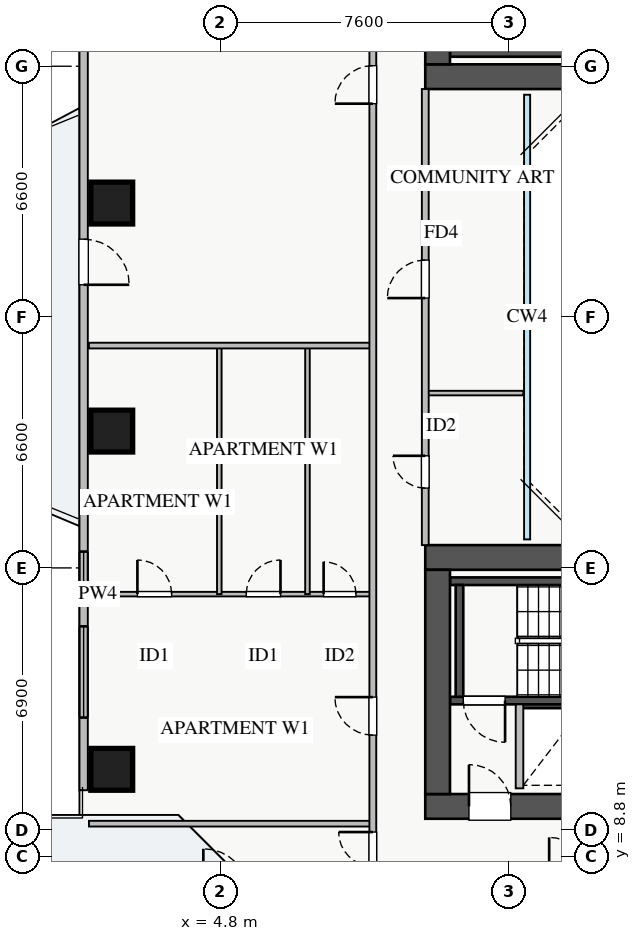
"""IFC4 building model, lengths in metres.
Left out: names, types, materials, properties, quantities, classifications, styles, units other than length and angle.
Written with IfcOpenShell. Run it as: python <this file> out.ifc"""

import sys

from ifc_helpers import new_model, si_unit, direction, frame, frame_2d, origin, origin_2d, place, context, subcontext, project, spatial, rectangle, extrude, source, transform, mapped, element, fill, save


model = new_model("IFC4")
c1 = context("Model", 3, precision=1e-05, world=origin(), true_north=direction((0.0, 1.0)))
c2 = subcontext(c1, "Body", "Model", "MODEL_VIEW")
j1 = project(units=[si_unit("LENGTHUNIT", "METRE"), si_unit("PLANEANGLEUNIT", "RADIAN")], contexts=[c1])
p1 = place(None, origin())
s1 = spatial("IfcSite", under=j1, at=p1, CompositionType="ELEMENT")
p2 = place(p1, origin())
s2 = spatial("IfcBuilding", under=s1, at=p2, CompositionType="ELEMENT")
p3 = place(p2, frame((0.0, 0.0, 103.5)))
s3 = spatial("IfcBuildingStorey", under=s2, at=p3, CompositionType="ELEMENT", Elevation=103.5)
p4 = place(p3, frame((12.68, 12.8, 0.0), z_axis=(0.0, 0.0, 1.0), x_axis=(1.0, 0.0, 0.0)))
e1 = element("IfcWall", 1, at=p4, inside=s3, PredefinedType="SHEAR", context=c2, shape_type="SweptSolid", body=[
    extrude(rectangle(XDim=1.94, YDim=0.18, at=frame_2d((0.97, 0.0))), origin(), (0.0, 0.0, 1.0), 3.07),
])
p5 = place(p3, frame((10.85, 29.95, 0.0), z_axis=(0.0, 0.0, 1.0), x_axis=(1.0, 0.0, 0.0)))
e2 = element("IfcWall", 2, at=p5, inside=s3, PredefinedType="SHEAR", context=c2, shape_type="SweptSolid", body=[
    extrude(rectangle(XDim=7.3, YDim=0.2, at=frame_2d((3.65, 0.0))), origin(), (0.0, 0.0, 1.0), 3.25),
])
p6 = place(p3, frame((10.85, 12.91, 0.0), z_axis=(0.0, 0.0, 1.0), x_axis=(1.0, 0.0, 0.0)))
e3 = element("IfcWall", 3, at=p6, inside=s3, PredefinedType="SHEAR", context=c2, shape_type="SweptSolid", body=[
    extrude(rectangle(XDim=7.3, YDim=0.2, at=frame_2d((3.65, 0.0))), origin(), (0.0, 0.0, 1.0), 3.25),
])
p7 = place(p6, frame((0.35, 0.0, 0.0)))
e4 = element("IfcOpeningElement", 4, at=p7, cuts=e3, PredefinedType="OPENING", context=c2, shape_type="SweptSolid", body=[
    extrude(rectangle(XDim=1.1, YDim=2.05, at=frame_2d((0.55, 1.025))), frame((0.0, 0.11, 0.0), z_axis=(0.0, -1.0, 0.0), x_axis=(1.0, 0.0, 0.0)), (0.0, 0.0, 1.0), 0.22),
])
p8 = place(p3, frame((10.85, 16.05, 0.0), z_axis=(0.0, 0.0, 1.0), x_axis=(1.0, 0.0, 0.0)))
e5 = element("IfcWall", 5, at=p8, inside=s3, PredefinedType="SHEAR", context=c2, shape_type="SweptSolid", body=[
    extrude(rectangle(XDim=7.3, YDim=0.2, at=frame_2d((3.65, 0.0))), origin(), (0.0, 0.0, 1.0), 3.25),
])
p9 = place(p3, frame((11.1, 13.01, 0.0), z_axis=(0.0, 0.0, 1.0), x_axis=(0.0, 1.0, 0.0)))
e6 = element("IfcWall", 6, at=p9, inside=s3, PredefinedType="SHEAR", context=c2, shape_type="SweptSolid", body=[
    extrude(rectangle(XDim=2.94, YDim=0.2, at=frame_2d((1.47, 0.0))), origin(), (0.0, 0.0, 1.0), 3.25),
])
p10 = place(p3, frame((10.2, 29.325, 0.0), z_axis=(0.0, 0.0, 1.0), x_axis=(1.0, 0.0, 0.0)))
e7 = element("IfcWall", 7, at=p10, inside=s3, PredefinedType="SHEAR", context=c2, shape_type="SweptSolid", body=[
    extrude(rectangle(XDim=17.6, YDim=0.65, at=frame_2d((8.8, 0.0))), origin(), (0.0, 0.0, 1.0), 3.25),
])
p11 = place(p3, frame((10.525, 29.65, 0.0), z_axis=(0.0, 0.0, 1.0), x_axis=(0.0, 1.0, 0.0)))
e8 = element("IfcWall", 8, at=p11, inside=s3, PredefinedType="SHEAR", context=c2, shape_type="SweptSolid", body=[
    extrude(rectangle(XDim=5.9, YDim=0.65, at=frame_2d((2.95, 0.0))), origin(), (0.0, 0.0, 1.0), 3.25),
])
p12 = place(p3, frame((10.2, 10.125, 0.0), z_axis=(0.0, 0.0, 1.0), x_axis=(1.0, 0.0, 0.0)))
e9 = element("IfcWall", 9, at=p12, inside=s3, PredefinedType="SHEAR", context=c2, shape_type="SweptSolid", body=[
    extrude(rectangle(XDim=17.6, YDim=0.65, at=frame_2d((8.8, 0.0))), origin(), (0.0, 0.0, 1.0), 3.25),
])
p13 = place(p12, frame((1.15, 0.0, 0.0)))
e10 = element("IfcOpeningElement", 10, at=p13, cuts=e9, PredefinedType="OPENING", context=c2, shape_type="SweptSolid", body=[
    extrude(rectangle(XDim=1.1, YDim=2.05, at=frame_2d((0.55, 1.025))), frame((0.0, 0.335, 0.0), z_axis=(0.0, -1.0, 0.0), x_axis=(1.0, 0.0, 0.0)), (0.0, 0.0, 1.0), 0.67),
])
p14 = place(p12, frame((8.3, 0.0, 0.0)))
e11 = element("IfcOpeningElement", 11, at=p14, cuts=e9, PredefinedType="OPENING", context=c2, shape_type="SweptSolid", body=[
    extrude(rectangle(XDim=1.1, YDim=2.05, at=frame_2d((0.55, 1.025))), frame((0.0, 0.335, 0.0), z_axis=(0.0, -1.0, 0.0), x_axis=(1.0, 0.0, 0.0)), (0.0, 0.0, 1.0), 0.67),
])
p15 = place(p12, frame((4.9, 0.0, 0.0)))
e12 = element("IfcOpeningElement", 12, at=p15, cuts=e9, PredefinedType="OPENING", context=c2, shape_type="SweptSolid", body=[
    extrude(rectangle(XDim=1.1, YDim=2.05, at=frame_2d((0.55, 1.025))), frame((0.0, 0.335, 0.0), z_axis=(0.0, -1.0, 0.0), x_axis=(1.0, 0.0, 0.0)), (0.0, 0.0, 1.0), 0.67),
])
p16 = place(p12, frame((14.74, 0.0, 0.0)))
e13 = element("IfcOpeningElement", 13, at=p16, cuts=e9, PredefinedType="OPENING", context=c2, shape_type="SweptSolid", body=[
    extrude(rectangle(XDim=1.0, YDim=2.05, at=frame_2d((0.5, 1.025))), frame((0.0, 0.335, 0.0), z_axis=(0.0, -1.0, 0.0), x_axis=(1.0, 0.0, 0.0)), (0.0, 0.0, 1.0), 0.67),
])
p17 = place(p12, frame((10.155, 0.0, 0.0)))
e14 = element("IfcOpeningElement", 14, at=p17, cuts=e9, PredefinedType="OPENING", context=c2, shape_type="SweptSolid", body=[
    extrude(rectangle(XDim=1.0, YDim=2.05, at=frame_2d((0.5, 1.025))), frame((0.0, 0.335, 0.0), z_axis=(0.0, -1.0, 0.0), x_axis=(1.0, 0.0, 0.0)), (0.0, 0.0, 1.0), 0.67),
])
p18 = place(p12, frame((11.87, 0.0, 0.0)))
e15 = element("IfcOpeningElement", 15, at=p18, cuts=e9, PredefinedType="OPENING", context=c2, shape_type="SweptSolid", body=[
    extrude(rectangle(XDim=1.0, YDim=2.05, at=frame_2d((0.5, 1.025))), frame((0.0, 0.335, 0.0), z_axis=(0.0, -1.0, 0.0), x_axis=(1.0, 0.0, 0.0)), (0.0, 0.0, 1.0), 0.67),
])
p19 = place(p12, frame((13.46, 0.0, 0.0)))
e16 = element("IfcOpeningElement", 16, at=p19, cuts=e9, PredefinedType="OPENING", context=c2, shape_type="SweptSolid", body=[
    extrude(rectangle(XDim=1.0, YDim=2.05, at=frame_2d((0.5, 1.025))), frame((0.0, 0.335, 0.0), z_axis=(0.0, -1.0, 0.0), x_axis=(1.0, 0.0, 0.0)), (0.0, 0.0, 1.0), 0.67),
])
p20 = place(p3, frame((10.2, 16.675, 0.0), z_axis=(0.0, 0.0, 1.0), x_axis=(1.0, 0.0, 0.0)))
e17 = element("IfcWall", 17, at=p20, inside=s3, PredefinedType="SHEAR", context=c2, shape_type="SweptSolid", body=[
    extrude(rectangle(XDim=17.6, YDim=0.65, at=frame_2d((8.8, 0.0))), origin(), (0.0, 0.0, 1.0), 3.25),
])
p21 = place(p3, frame((10.525, 10.45, 0.0), z_axis=(0.0, 0.0, 1.0), x_axis=(0.0, 1.0, 0.0)))
e18 = element("IfcWall", 18, at=p21, inside=s3, PredefinedType="SHEAR", context=c2, shape_type="SweptSolid", body=[
    extrude(rectangle(XDim=5.9, YDim=0.65, at=frame_2d((2.95, 0.0))), origin(), (0.0, 0.0, 1.0), 3.25),
])
m1 = source(origin(), c2, "Body", "SweptSolid", [
    extrude(rectangle(XDim=1.1, YDim=1.1, at=origin_2d()), origin(), (0.0, 0.0, 1.0), 3.25),
])
for number, where, z_axis, x_axis in (
    (19, (1.95, 26.0, 0.0), (0.0, 0.0, 1.0), (1.0, 0.0, 0.0)),
    (20, (1.95, 20.0, 0.0), (0.0, 0.0, 1.0), (1.0, 0.0, 0.0)),
    (21, (1.95, 11.1, 0.0), (0.0, 0.0, 1.0), (1.0, 0.0, 0.0)),
):
    element("IfcColumn", number, at=place(p3, frame(where, z_axis=z_axis, x_axis=x_axis)), inside=s3, PredefinedType="COLUMN", context=c2, shape_type="MappedRepresentation", body=[
        mapped(m1, transform((0.0, 0.0, 0.0), x_axis=(1.0, 0.0, 0.0), y_axis=(0.0, 1.0, 0.0), z_axis=(0.0, 0.0, 1.0), scale=1.0)),
    ])
p22 = place(p3, frame((1.21, 10.55, 0.0), z_axis=(0.0, 0.0, 1.0), x_axis=(0.0, 1.0, 0.0)))
e22 = element("IfcWall", 22, at=p22, inside=s3, PredefinedType="STANDARD", context=c2, shape_type="SweptSolid", body=[
    extrude(rectangle(XDim=24.9, YDim=0.22, at=frame_2d((12.45, 0.0))), origin(), (0.0, 0.0, 1.0), 2.61),
])
p23 = place(p22, frame((13.3, 0.0, 0.0)))
e23 = element("IfcOpeningElement", 23, at=p23, cuts=e22, PredefinedType="OPENING", context=c2, shape_type="SweptSolid", body=[
    extrude(rectangle(XDim=1.2, YDim=2.1, at=frame_2d((0.6, 1.05))), frame((0.0, 0.12, 0.0), z_axis=(0.0, -1.0, 0.0), x_axis=(1.0, 0.0, 0.0)), (0.0, 0.0, 1.0), 0.24),
])
p24 = place(p22, frame((1.912, 0.0, 0.9)))
e24 = element("IfcOpeningElement", 24, at=p24, cuts=e22, PredefinedType="OPENING", context=c2, shape_type="SweptSolid", body=[
    extrude(rectangle(XDim=2.4, YDim=1.48, at=frame_2d((1.2, 0.74))), frame((0.0, 0.12, 0.0), z_axis=(0.0, -1.0, 0.0), x_axis=(1.0, 0.0, 0.0)), (0.0, 0.0, 1.0), 0.24),
])
p25 = place(p22, frame((20.737, 0.0, 0.9)))
e25 = element("IfcOpeningElement", 25, at=p25, cuts=e22, PredefinedType="OPENING", context=c2, shape_type="SweptSolid", body=[
    extrude(rectangle(XDim=2.1, YDim=1.48, at=frame_2d((1.05, 0.74))), frame((0.0, 0.12, 0.0), z_axis=(0.0, -1.0, 0.0), x_axis=(1.0, 0.0, 0.0)), (0.0, 0.0, 1.0), 0.24),
])
p26 = place(p22, frame((5.38, 0.0, 0.9)))
e26 = element("IfcOpeningElement", 26, at=p26, cuts=e22, PredefinedType="OPENING", context=c2, shape_type="SweptSolid", body=[
    extrude(rectangle(XDim=0.9, YDim=1.2, at=frame_2d((0.45, 0.6))), frame((0.0, 0.12, 0.0), z_axis=(0.0, -1.0, 0.0), x_axis=(1.0, 0.0, 0.0)), (0.0, 0.0, 1.0), 0.24),
])
p27 = place(p3, frame((12.68, 10.6, 0.0), z_axis=(0.0, 0.0, 1.0), x_axis=(0.0, 1.0, 0.0)))
e27 = element("IfcWall", 27, at=p27, inside=s3, PredefinedType="PARTITIONING", context=c2, shape_type="SweptSolid", body=[
    extrude(rectangle(XDim=2.21, YDim=0.2, at=frame_2d((1.105, 0.0))), origin(), (0.0, 0.0, 1.0), 3.07),
])
p28 = place(p3, frame((1.35, 9.67, 0.0), z_axis=(0.0, 0.0, 1.0), x_axis=(1.0, 0.0, 0.0)))
e28 = element("IfcWall", 28, at=p28, inside=s3, PredefinedType="PARTITIONING", context=c2, shape_type="SweptSolid", body=[
    extrude(rectangle(XDim=7.47, YDim=0.15, at=frame_2d((3.735, 0.0))), origin(), (0.0, 0.0, 1.0), 3.07),
])
p29 = place(p3, frame((1.35, 15.71, 0.0), z_axis=(0.0, 0.0, 1.0), x_axis=(1.0, 0.0, 0.0)))
e29 = element("IfcWall", 29, at=p29, inside=s3, PredefinedType="PLUMBINGWALL", context=c2, shape_type="SweptSolid", body=[
    extrude(rectangle(XDim=7.47, YDim=0.12, at=frame_2d((3.735, 0.0))), origin(), (0.0, 0.0, 1.0), 3.07),
])
p30 = place(p29, frame((1.275, 0.0, 0.0)))
e30 = element("IfcOpeningElement", 30, at=p30, cuts=e29, PredefinedType="OPENING", context=c2, shape_type="SweptSolid", body=[
    extrude(rectangle(XDim=0.9, YDim=2.05, at=frame_2d((0.45, 1.025))), frame((0.0, 0.07, 0.0), z_axis=(0.0, -1.0, 0.0), x_axis=(1.0, 0.0, 0.0)), (0.0, 0.0, 1.0), 0.14),
])
p31 = place(p29, frame((4.14, 0.0, 0.0)))
e31 = element("IfcOpeningElement", 31, at=p31, cuts=e29, PredefinedType="OPENING", context=c2, shape_type="SweptSolid", body=[
    extrude(rectangle(XDim=0.9, YDim=2.05, at=frame_2d((0.45, 1.025))), frame((0.0, 0.07, 0.0), z_axis=(0.0, -1.0, 0.0), x_axis=(1.0, 0.0, 0.0)), (0.0, 0.0, 1.0), 0.14),
])
p32 = place(p29, frame((6.175, 0.0, 0.0)))
e32 = element("IfcOpeningElement", 32, at=p32, cuts=e29, PredefinedType="OPENING", context=c2, shape_type="SweptSolid", body=[
    extrude(rectangle(XDim=0.85, YDim=2.05, at=frame_2d((0.425, 1.025))), frame((0.0, 0.07, 0.0), z_axis=(0.0, -1.0, 0.0), x_axis=(1.0, 0.0, 0.0)), (0.0, 0.0, 1.0), 0.14),
])
for number, where, z_axis, x_axis in (
    (33, (4.78, 15.71, 0.0), (0.0, 0.0, 1.0), (0.0, 1.0, 0.0)),
    (34, (7.1, 15.71, 0.0), (0.0, 0.0, 1.0), (0.0, 1.0, 0.0)),
):
    element("IfcWall", number, at=place(p3, frame(where, z_axis=z_axis, x_axis=x_axis)), inside=s3, PredefinedType="PLUMBINGWALL", context=c2, shape_type="SweptSolid", body=[
        extrude(rectangle(XDim=6.54, YDim=0.12, at=frame_2d((3.27, 0.0))), origin(), (0.0, 0.0, 1.0), 3.07),
    ])
p33 = place(p3, frame((1.35, 22.25, 0.0), z_axis=(0.0, 0.0, 1.0), x_axis=(1.0, 0.0, 0.0)))
e35 = element("IfcWall", 35, at=p33, inside=s3, PredefinedType="PARTITIONING", context=c2, shape_type="SweptSolid", body=[
    extrude(rectangle(XDim=7.47, YDim=0.15, at=frame_2d((3.735, 0.0))), origin(), (0.0, 0.0, 1.0), 3.07),
])
p34 = place(p3, frame((8.82, 8.31, 0.0), z_axis=(0.0, 0.0, 1.0), x_axis=(0.0, 1.0, 0.0)))
e36 = element("IfcWall", 36, at=p34, inside=s3, PredefinedType="PARTITIONING", context=c2, shape_type="SweptSolid", body=[
    extrude(rectangle(XDim=29.13, YDim=0.18, at=frame_2d((14.565, 0.0))), origin(), (0.0, 0.0, 1.0), 3.07),
])
p35 = place(p34, frame((27.94, 0.0, 0.0)))
e37 = element("IfcOpeningElement", 37, at=p35, cuts=e36, PredefinedType="OPENING", context=c2, shape_type="SweptSolid", body=[
    extrude(rectangle(XDim=0.9, YDim=2.05, at=frame_2d((0.45, 1.025))), frame((0.0, 0.1, 0.0), z_axis=(0.0, -1.0, 0.0), x_axis=(1.0, 0.0, 0.0)), (0.0, 0.0, 1.0), 0.2),
])
p36 = place(p34, frame((0.24, 0.0, 0.0)))
e38 = element("IfcOpeningElement", 38, at=p36, cuts=e36, PredefinedType="OPENING", context=c2, shape_type="SweptSolid", body=[
    extrude(rectangle(XDim=0.9, YDim=2.05, at=frame_2d((0.45, 1.025))), frame((0.0, 0.1, 0.0), z_axis=(0.0, -1.0, 0.0), x_axis=(1.0, 0.0, 0.0)), (0.0, 0.0, 1.0), 0.2),
])
p37 = place(p34, frame((3.69, 0.0, 0.0)))
e39 = element("IfcOpeningElement", 39, at=p37, cuts=e36, PredefinedType="OPENING", context=c2, shape_type="SweptSolid", body=[
    extrude(rectangle(XDim=1.0, YDim=2.05, at=frame_2d((0.5, 1.025))), frame((0.0, 0.1, 0.0), z_axis=(0.0, -1.0, 0.0), x_axis=(1.0, 0.0, 0.0)), (0.0, 0.0, 1.0), 0.2),
])
p38 = place(p34, frame((20.305, 0.0, 0.0)))
e40 = element("IfcOpeningElement", 40, at=p38, cuts=e36, PredefinedType="OPENING", context=c2, shape_type="SweptSolid", body=[
    extrude(rectangle(XDim=1.0, YDim=2.05, at=frame_2d((0.5, 1.025))), frame((0.0, 0.1, 0.0), z_axis=(0.0, -1.0, 0.0), x_axis=(1.0, 0.0, 0.0)), (0.0, 0.0, 1.0), 0.2),
])
p39 = place(p3, frame((10.2, 21.0, 0.0), z_axis=(0.0, 0.0, 1.0), x_axis=(1.0, 0.0, 0.0)))
e41 = element("IfcWall", 41, at=p39, inside=s3, PredefinedType="PLUMBINGWALL", context=c2, shape_type="SweptSolid", body=[
    extrude(rectangle(XDim=2.58, YDim=0.12, at=frame_2d((1.29, 0.0))), origin(), (0.0, 0.0, 1.0), 3.07),
])
p40 = place(p3, frame((10.2, 17.0, 0.0), z_axis=(0.0, 0.0, 1.0), x_axis=(0.0, 1.0, 0.0)))
e42 = element("IfcWall", 42, at=p40, inside=s3, PredefinedType="PARTITIONING", context=c2, shape_type="SweptSolid", body=[
    extrude(rectangle(XDim=12.0, YDim=0.18, at=frame_2d((6.0, 0.0))), origin(), (0.0, 0.0, 1.0), 3.07),
])
p41 = place(p40, frame((1.5, 0.0, 0.0)))
e43 = element("IfcOpeningElement", 43, at=p41, cuts=e42, PredefinedType="OPENING", context=c2, shape_type="SweptSolid", body=[
    extrude(rectangle(XDim=0.85, YDim=2.05, at=frame_2d((0.425, 1.025))), frame((0.0, 0.1, 0.0), z_axis=(0.0, -1.0, 0.0), x_axis=(1.0, 0.0, 0.0)), (0.0, 0.0, 1.0), 0.2),
])
p42 = place(p40, frame((6.5, 0.0, 0.0)))
e44 = element("IfcOpeningElement", 44, at=p42, cuts=e42, PredefinedType="OPENING", context=c2, shape_type="SweptSolid", body=[
    extrude(rectangle(XDim=1.0, YDim=2.05, at=frame_2d((0.5, 1.025))), frame((0.0, 0.1, 0.0), z_axis=(0.0, -1.0, 0.0), x_axis=(1.0, 0.0, 0.0)), (0.0, 0.0, 1.0), 0.2),
])
m2 = source(origin(), c2, "Body", "SweptSolid", [
    extrude(rectangle(XDim=1.2, YDim=2.1, at=frame_2d((0.6, 1.05))), frame((0.0, 0.025, 0.0), z_axis=(0.0, -1.0, 0.0), x_axis=(1.0, 0.0, 0.0)), (0.0, 0.0, 1.0), 0.05),
])
p43 = place(p23, frame((1.2, 0.0, 0.0), z_axis=(0.0, 0.0, 1.0), x_axis=(-1.0, 0.0, 0.0)))
e45 = element("IfcDoor", 45, at=p43, inside=s3, OperationType="SINGLE_SWING_LEFT", PredefinedType="DOOR", context=c2, shape_type="MappedRepresentation", body=[
    mapped(m2, transform((0.0, 0.0, 0.0), x_axis=(1.0, 0.0, 0.0), y_axis=(0.0, 1.0, 0.0), z_axis=(0.0, 0.0, 1.0), scale=1.0)),
])
fill(e23, e45)
m3 = source(origin(), c2, "Body", "SweptSolid", [
    extrude(rectangle(XDim=2.4, YDim=1.48, at=frame_2d((1.2, 0.74))), frame((0.0, 0.03, 0.0), z_axis=(0.0, -1.0, 0.0), x_axis=(1.0, 0.0, 0.0)), (0.0, 0.0, 1.0), 0.06),
])
p44 = place(p24, origin())
e46 = element("IfcWindow", 46, at=p44, inside=s3, PartitioningType="TRIPLE_PANEL_VERTICAL", PredefinedType="WINDOW", context=c2, shape_type="MappedRepresentation", body=[
    mapped(m3, transform((0.0, 0.0, 0.0), x_axis=(1.0, 0.0, 0.0), y_axis=(0.0, 1.0, 0.0), z_axis=(0.0, 0.0, 1.0), scale=1.0)),
])
fill(e24, e46)
m4 = source(origin(), c2, "Body", "SweptSolid", [
    extrude(rectangle(XDim=1.1, YDim=2.05, at=frame_2d((0.55, 1.025))), frame((0.0, 0.025, 0.0), z_axis=(0.0, -1.0, 0.0), x_axis=(1.0, 0.0, 0.0)), (0.0, 0.0, 1.0), 0.05),
])
p45 = place(p13, origin())
e47 = element("IfcDoor", 47, at=p45, inside=s3, OperationType="SINGLE_SWING_LEFT", PredefinedType="DOOR", context=c2, shape_type="MappedRepresentation", body=[
    mapped(m4, transform((0.0, 0.0, 0.0), x_axis=(1.0, 0.0, 0.0), y_axis=(0.0, 1.0, 0.0), z_axis=(0.0, 0.0, 1.0), scale=1.0)),
])
fill(e10, e47)
p46 = place(p7, frame((1.1, 0.0, 0.0), z_axis=(0.0, 0.0, 1.0), x_axis=(-1.0, 0.0, 0.0)))
e48 = element("IfcDoor", 48, at=p46, inside=s3, OperationType="SINGLE_SWING_RIGHT", PredefinedType="DOOR", context=c2, shape_type="MappedRepresentation", body=[
    mapped(m4, transform((0.0, 0.0, 0.0), x_axis=(1.0, 0.0, 0.0), y_axis=(0.0, 1.0, 0.0), z_axis=(0.0, 0.0, 1.0), scale=1.0)),
])
fill(e4, e48)
m5 = source(origin(), c2, "Body", "SweptSolid", [
    extrude(rectangle(XDim=0.9, YDim=2.05, at=frame_2d((0.45, 1.025))), frame((0.0, 0.025, 0.0), z_axis=(0.0, -1.0, 0.0), x_axis=(1.0, 0.0, 0.0)), (0.0, 0.0, 1.0), 0.05),
])
p47 = place(p30, origin())
e49 = element("IfcDoor", 49, at=p47, inside=s3, OperationType="SINGLE_SWING_LEFT", PredefinedType="DOOR", context=c2, shape_type="MappedRepresentation", body=[
    mapped(m5, transform((0.0, 0.0, 0.0), x_axis=(1.0, 0.0, 0.0), y_axis=(0.0, 1.0, 0.0), z_axis=(0.0, 0.0, 1.0), scale=1.0)),
])
fill(e30, e49)
p48 = place(p31, origin())
e50 = element("IfcDoor", 50, at=p48, inside=s3, OperationType="SINGLE_SWING_RIGHT", PredefinedType="DOOR", context=c2, shape_type="MappedRepresentation", body=[
    mapped(m5, transform((0.0, 0.0, 0.0), x_axis=(1.0, 0.0, 0.0), y_axis=(0.0, 1.0, 0.0), z_axis=(0.0, 0.0, 1.0), scale=1.0)),
])
fill(e31, e50)
m6 = source(origin(), c2, "Body", "SweptSolid", [
    extrude(rectangle(XDim=0.85, YDim=2.05, at=frame_2d((0.425, 1.025))), frame((0.0, 0.025, 0.0), z_axis=(0.0, -1.0, 0.0), x_axis=(1.0, 0.0, 0.0)), (0.0, 0.0, 1.0), 0.05),
])
p49 = place(p32, origin())
e51 = element("IfcDoor", 51, at=p49, inside=s3, OperationType="SINGLE_SWING_LEFT", PredefinedType="DOOR", context=c2, shape_type="MappedRepresentation", body=[
    mapped(m6, transform((0.0, 0.0, 0.0), x_axis=(1.0, 0.0, 0.0), y_axis=(0.0, 1.0, 0.0), z_axis=(0.0, 0.0, 1.0), scale=1.0)),
])
fill(e32, e51)
p50 = place(p36, origin())
e52 = element("IfcDoor", 52, at=p50, inside=s3, OperationType="SINGLE_SWING_RIGHT", PredefinedType="DOOR", context=c2, shape_type="MappedRepresentation", body=[
    mapped(m5, transform((0.0, 0.0, 0.0), x_axis=(1.0, 0.0, 0.0), y_axis=(0.0, 1.0, 0.0), z_axis=(0.0, 0.0, 1.0), scale=1.0)),
])
fill(e38, e52)
m7 = source(origin(), c2, "Body", "SweptSolid", [
    extrude(rectangle(XDim=1.0, YDim=2.05, at=frame_2d((0.5, 1.025))), frame((0.0, 0.025, 0.0), z_axis=(0.0, -1.0, 0.0), x_axis=(1.0, 0.0, 0.0)), (0.0, 0.0, 1.0), 0.05),
])
p51 = place(p37, origin())
e53 = element("IfcDoor", 53, at=p51, inside=s3, OperationType="SINGLE_SWING_RIGHT", PredefinedType="DOOR", context=c2, shape_type="MappedRepresentation", body=[
    mapped(m7, transform((0.0, 0.0, 0.0), x_axis=(1.0, 0.0, 0.0), y_axis=(0.0, 1.0, 0.0), z_axis=(0.0, 0.0, 1.0), scale=1.0)),
])
fill(e39, e53)
p52 = place(p38, origin())
e54 = element("IfcDoor", 54, at=p52, inside=s3, OperationType="SINGLE_SWING_LEFT", PredefinedType="DOOR", context=c2, shape_type="MappedRepresentation", body=[
    mapped(m7, transform((0.0, 0.0, 0.0), x_axis=(1.0, 0.0, 0.0), y_axis=(0.0, 1.0, 0.0), z_axis=(0.0, 0.0, 1.0), scale=1.0)),
])
fill(e40, e54)
p53 = place(p41, origin())
e55 = element("IfcDoor", 55, at=p53, inside=s3, OperationType="SINGLE_SWING_RIGHT", PredefinedType="DOOR", context=c2, shape_type="MappedRepresentation", body=[
    mapped(m6, transform((0.0, 0.0, 0.0), x_axis=(1.0, 0.0, 0.0), y_axis=(0.0, 1.0, 0.0), z_axis=(0.0, 0.0, 1.0), scale=1.0)),
])
fill(e43, e55)
p54 = place(p42, origin())
e56 = element("IfcDoor", 56, at=p54, inside=s3, OperationType="SINGLE_SWING_LEFT", PredefinedType="DOOR", context=c2, shape_type="MappedRepresentation", body=[
    mapped(m7, transform((0.0, 0.0, 0.0), x_axis=(1.0, 0.0, 0.0), y_axis=(0.0, 1.0, 0.0), z_axis=(0.0, 0.0, 1.0), scale=1.0)),
])
fill(e44, e56)
m8 = source(origin(), c2, "Body", "SweptSolid", [
    extrude(rectangle(XDim=0.9, YDim=1.2, at=frame_2d((0.45, 0.6))), frame((0.0, 0.03, 0.0), z_axis=(0.0, -1.0, 0.0), x_axis=(1.0, 0.0, 0.0)), (0.0, 0.0, 1.0), 0.06),
])
p55 = place(p26, origin())
e57 = element("IfcWindow", 57, at=p55, inside=s3, PartitioningType="SINGLE_PANEL", PredefinedType="WINDOW", context=c2, shape_type="MappedRepresentation", body=[
    mapped(m8, transform((0.0, 0.0, 0.0), x_axis=(1.0, 0.0, 0.0), y_axis=(0.0, 1.0, 0.0), z_axis=(0.0, 0.0, 1.0), scale=1.0)),
])
fill(e26, e57)
save(model, sys.argv[1])
